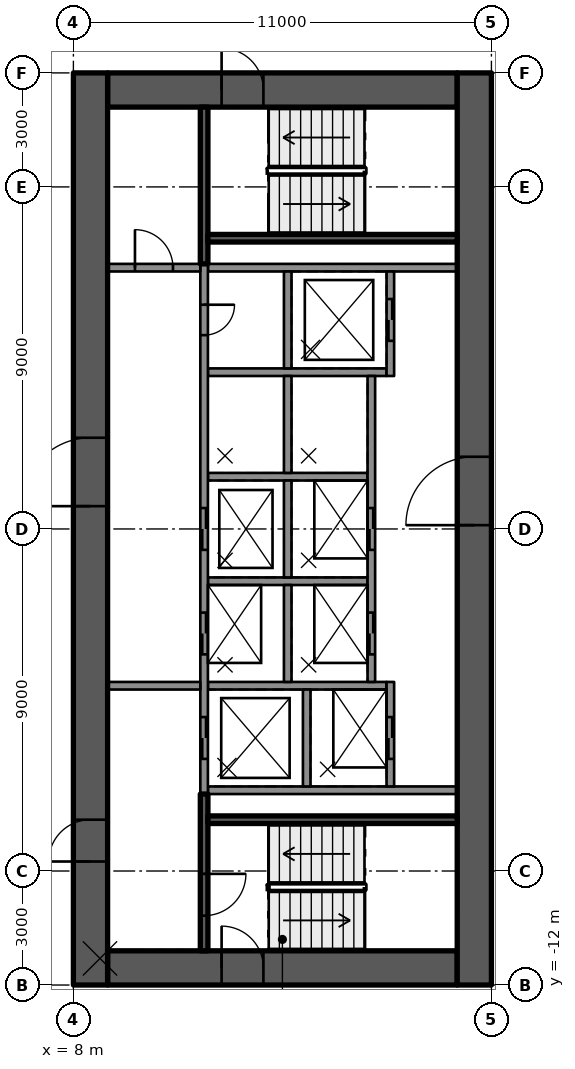
"""IFC4 building model, lengths in metres.
Left out: names, types, materials, properties, quantities, classifications, styles, units other than length and angle.
Written with IfcOpenShell. Run it as: python <this file> out.ifc"""

import sys

from ifc_helpers import new_model, si_unit, direction, frame, frame_2d, origin, place, context, subcontext, project, spatial, rectangle, extrude, element, fill, save


model = new_model("IFC4")
c1 = context("Model", 3, precision=1e-05, world=origin(), true_north=direction((0.0, 1.0)))
c2 = subcontext(c1, "Body", "Model", "MODEL_VIEW")
j1 = project(units=[si_unit("LENGTHUNIT", "METRE"), si_unit("PLANEANGLEUNIT", "RADIAN")], contexts=[c1])
p1 = place(None, origin())
s1 = spatial("IfcSite", under=j1, at=p1, CompositionType="ELEMENT")
p2 = place(p1, origin())
s2 = spatial("IfcBuilding", under=s1, at=p2, CompositionType="ELEMENT")
p3 = place(p2, frame((0.0, 0.0, 37.3)))
s3 = spatial("IfcBuildingStorey", under=s2, at=p3, CompositionType="ELEMENT", Elevation=37.3)
p4 = place(p3, frame((8.9, 11.55, 0.0), z_axis=(0.0, 0.0, 1.0), x_axis=(1.0, 0.0, 0.0)))
e1 = element("IfcWall", 1, at=p4, inside=s3, PredefinedType="SHEAR", context=c2, shape_type="SweptSolid", body=[
    extrude(rectangle(XDim=9.2, YDim=0.9, at=frame_2d((4.6, 0.0))), origin(), (0.0, 0.0, 1.0), 3.5),
])
p5 = place(p4, frame((3.0, 0.0, 0.0)))
e2 = element("IfcOpeningElement", 2, at=p5, cuts=e1, PredefinedType="OPENING", context=c2, shape_type="SweptSolid", body=[
    extrude(rectangle(XDim=1.1, YDim=2.1, at=frame_2d((0.55, 1.05))), frame((0.0, 0.46, 0.0), z_axis=(0.0, -1.0, 0.0), x_axis=(1.0, 0.0, 0.0)), (0.0, 0.0, 1.0), 0.92),
])
p6 = place(p3, frame((8.9, -11.55, 0.0), z_axis=(0.0, 0.0, 1.0), x_axis=(1.0, 0.0, 0.0)))
e3 = element("IfcWall", 3, at=p6, inside=s3, PredefinedType="SHEAR", context=c2, shape_type="SweptSolid", body=[
    extrude(rectangle(XDim=9.2, YDim=0.9, at=frame_2d((4.6, 0.0))), origin(), (0.0, 0.0, 1.0), 3.5),
])
p7 = place(p6, frame((3.0, 0.0, 0.0)))
e4 = element("IfcOpeningElement", 4, at=p7, cuts=e3, PredefinedType="OPENING", context=c2, shape_type="SweptSolid", body=[
    extrude(rectangle(XDim=1.1, YDim=2.1, at=frame_2d((0.55, 1.05))), frame((0.0, 0.46, 0.0), z_axis=(0.0, -1.0, 0.0), x_axis=(1.0, 0.0, 0.0)), (0.0, 0.0, 1.0), 0.92),
])
p8 = place(p3, frame((8.45, -12.0, 0.0), z_axis=(0.0, 0.0, 1.0), x_axis=(0.0, 1.0, 0.0)))
e5 = element("IfcWall", 5, at=p8, inside=s3, PredefinedType="SHEAR", context=c2, shape_type="SweptSolid", body=[
    extrude(rectangle(XDim=24.0, YDim=0.9, at=frame_2d((12.0, 0.0))), origin(), (0.0, 0.0, 1.0), 3.5),
])
p9 = place(p8, frame((12.6, 0.0, 0.0)))
e6 = element("IfcOpeningElement", 6, at=p9, cuts=e5, PredefinedType="OPENING", context=c2, shape_type="SweptSolid", body=[
    extrude(rectangle(XDim=1.8, YDim=2.1, at=frame_2d((0.9, 1.05))), frame((0.0, 0.46, 0.0), z_axis=(0.0, -1.0, 0.0), x_axis=(1.0, 0.0, 0.0)), (0.0, 0.0, 1.0), 0.92),
])
p10 = place(p8, frame((3.25, 0.0, 0.0)))
e7 = element("IfcOpeningElement", 7, at=p10, cuts=e5, PredefinedType="OPENING", context=c2, shape_type="SweptSolid", body=[
    extrude(rectangle(XDim=1.1, YDim=2.1, at=frame_2d((0.55, 1.05))), frame((0.0, 0.46, 0.0), z_axis=(0.0, -1.0, 0.0), x_axis=(1.0, 0.0, 0.0)), (0.0, 0.0, 1.0), 0.92),
])
p11 = place(p3, frame((18.55, -12.0, 0.0), z_axis=(0.0, 0.0, 1.0), x_axis=(0.0, 1.0, 0.0)))
e8 = element("IfcWall", 8, at=p11, inside=s3, PredefinedType="SHEAR", context=c2, shape_type="SweptSolid", body=[
    extrude(rectangle(XDim=24.0, YDim=0.9, at=frame_2d((12.0, 0.0))), origin(), (0.0, 0.0, 1.0), 3.5),
])
p12 = place(p11, frame((12.1, 0.0, 0.0)))
e9 = element("IfcOpeningElement", 9, at=p12, cuts=e8, PredefinedType="OPENING", context=c2, shape_type="SweptSolid", body=[
    extrude(rectangle(XDim=1.8, YDim=2.1, at=frame_2d((0.9, 1.05))), frame((0.0, 0.46, 0.0), z_axis=(0.0, -1.0, 0.0), x_axis=(1.0, 0.0, 0.0)), (0.0, 0.0, 1.0), 0.92),
])
for number, where, z_axis, x_axis in (
    (10, (11.54, -6.875, 0.0), (0.0, 0.0, 1.0), (1.0, 0.0, 0.0)),
    (11, (11.54, 6.875, 0.0), (0.0, 0.0, 1.0), (1.0, 0.0, 0.0)),
):
    element("IfcWall", number, at=place(p3, frame(where, z_axis=z_axis, x_axis=x_axis)), inside=s3, PredefinedType="SOLIDWALL", context=c2, shape_type="SweptSolid", body=[
        extrude(rectangle(XDim=6.56, YDim=0.2, at=frame_2d((3.28, 0.0))), origin(), (0.0, 0.0, 1.0), 3.08),
    ])
p13 = place(p3, frame((11.54, 4.125, 0.0), z_axis=(0.0, 0.0, 1.0), x_axis=(1.0, 0.0, 0.0)))
e12 = element("IfcWall", 12, at=p13, inside=s3, PredefinedType="SOLIDWALL", context=c2, shape_type="SweptSolid", body=[
    extrude(rectangle(XDim=4.7, YDim=0.2, at=frame_2d((2.35, 0.0))), origin(), (0.0, 0.0, 1.0), 3.08),
])
for number, where, z_axis, x_axis in (
    (13, (11.54, 1.375, 0.0), (0.0, 0.0, 1.0), (1.0, 0.0, 0.0)),
    (14, (11.54, -1.375, 0.0), (0.0, 0.0, 1.0), (1.0, 0.0, 0.0)),
):
    element("IfcWall", number, at=place(p3, frame(where, z_axis=z_axis, x_axis=x_axis)), inside=s3, PredefinedType="SOLIDWALL", context=c2, shape_type="SweptSolid", body=[
        extrude(rectangle(XDim=4.2, YDim=0.2, at=frame_2d((2.1, 0.0))), origin(), (0.0, 0.0, 1.0), 3.08),
    ])
p14 = place(p3, frame((11.54, -4.125, 0.0), z_axis=(0.0, 0.0, 1.0), x_axis=(1.0, 0.0, 0.0)))
e15 = element("IfcWall", 15, at=p14, inside=s3, PredefinedType="SOLIDWALL", context=c2, shape_type="SweptSolid", body=[
    extrude(rectangle(XDim=4.7, YDim=0.2, at=frame_2d((2.35, 0.0))), origin(), (0.0, 0.0, 1.0), 3.08),
])
p15 = place(p3, frame((11.44, 6.975, 0.0), z_axis=(0.0, 0.0, 1.0), x_axis=(0.0, -1.0, 0.0)))
e16 = element("IfcWall", 16, at=p15, inside=s3, PredefinedType="SOLIDWALL", context=c2, shape_type="SweptSolid", body=[
    extrude(rectangle(XDim=13.95, YDim=0.2, at=frame_2d((6.975, 0.0))), origin(), (0.0, 0.0, 1.0), 3.08),
])
p16 = place(p15, frame((6.425, 0.0, 0.0)))
e17 = element("IfcOpeningElement", 17, at=p16, cuts=e16, PredefinedType="OPENING", context=c2, shape_type="SweptSolid", body=[
    extrude(rectangle(XDim=1.1, YDim=2.1, at=frame_2d((0.55, 1.05))), frame((0.0, 0.11, 0.0), z_axis=(0.0, -1.0, 0.0), x_axis=(1.0, 0.0, 0.0)), (0.0, 0.0, 1.0), 0.22),
])
p17 = place(p15, frame((9.175, 0.0, 0.0)))
e18 = element("IfcOpeningElement", 18, at=p17, cuts=e16, PredefinedType="OPENING", context=c2, shape_type="SweptSolid", body=[
    extrude(rectangle(XDim=1.1, YDim=2.1, at=frame_2d((0.55, 1.05))), frame((0.0, 0.11, 0.0), z_axis=(0.0, -1.0, 0.0), x_axis=(1.0, 0.0, 0.0)), (0.0, 0.0, 1.0), 0.22),
])
p18 = place(p15, frame((11.925, 0.0, 0.0)))
e19 = element("IfcOpeningElement", 19, at=p18, cuts=e16, PredefinedType="OPENING", context=c2, shape_type="SweptSolid", body=[
    extrude(rectangle(XDim=1.1, YDim=2.1, at=frame_2d((0.55, 1.05))), frame((0.0, 0.11, 0.0), z_axis=(0.0, -1.0, 0.0), x_axis=(1.0, 0.0, 0.0)), (0.0, 0.0, 1.0), 0.22),
])
p19 = place(p15, frame((1.075, 0.0, 0.0)))
e20 = element("IfcOpeningElement", 20, at=p19, cuts=e16, PredefinedType="OPENING", context=c2, shape_type="SweptSolid", body=[
    extrude(rectangle(XDim=0.8, YDim=2.1, at=frame_2d((0.4, 1.05))), frame((0.0, 0.11, 0.0), z_axis=(0.0, -1.0, 0.0), x_axis=(1.0, 0.0, 0.0)), (0.0, 0.0, 1.0), 0.22),
])
for number, where, z_axis, x_axis in (
    (21, (13.64, 6.775, 0.0), (0.0, 0.0, 1.0), (0.0, -1.0, 0.0)),
    (22, (13.64, 4.025, 0.0), (0.0, 0.0, 1.0), (0.0, -1.0, 0.0)),
    (23, (13.64, 1.275, 0.0), (0.0, 0.0, 1.0), (0.0, -1.0, 0.0)),
    (24, (13.64, -1.475, 0.0), (0.0, 0.0, 1.0), (0.0, -1.0, 0.0)),
    (25, (14.14, -4.225, 0.0), (0.0, 0.0, 1.0), (0.0, -1.0, 0.0)),
):
    element("IfcWall", number, at=place(p3, frame(where, z_axis=z_axis, x_axis=x_axis)), inside=s3, PredefinedType="SOLIDWALL", context=c2, shape_type="SweptSolid", body=[
        extrude(rectangle(XDim=2.55, YDim=0.2, at=frame_2d((1.275, 0.0))), origin(), (0.0, 0.0, 1.0), 3.08),
    ])
p20 = place(p3, frame((16.34, 6.775, 0.0), z_axis=(0.0, 0.0, 1.0), x_axis=(0.0, -1.0, 0.0)))
e26 = element("IfcWall", 26, at=p20, inside=s3, PredefinedType="SOLIDWALL", context=c2, shape_type="SweptSolid", body=[
    extrude(rectangle(XDim=2.75, YDim=0.2, at=frame_2d((1.375, 0.0))), origin(), (0.0, 0.0, 1.0), 3.08),
])
p21 = place(p20, frame((0.725, 0.0, 0.0)))
e27 = element("IfcOpeningElement", 27, at=p21, cuts=e26, PredefinedType="OPENING", context=c2, shape_type="SweptSolid", body=[
    extrude(rectangle(XDim=1.1, YDim=2.1, at=frame_2d((0.55, 1.05))), frame((0.0, 0.11, 0.0), z_axis=(0.0, -1.0, 0.0), x_axis=(1.0, 0.0, 0.0)), (0.0, 0.0, 1.0), 0.22),
])
p22 = place(p3, frame((15.84, 4.025, 0.0), z_axis=(0.0, 0.0, 1.0), x_axis=(0.0, -1.0, 0.0)))
e28 = element("IfcWall", 28, at=p22, inside=s3, PredefinedType="SOLIDWALL", context=c2, shape_type="SweptSolid", body=[
    extrude(rectangle(XDim=8.05, YDim=0.2, at=frame_2d((4.025, 0.0))), origin(), (0.0, 0.0, 1.0), 3.08),
])
p23 = place(p22, frame((3.475, 0.0, 0.0)))
e29 = element("IfcOpeningElement", 29, at=p23, cuts=e28, PredefinedType="OPENING", context=c2, shape_type="SweptSolid", body=[
    extrude(rectangle(XDim=1.1, YDim=2.1, at=frame_2d((0.55, 1.05))), frame((0.0, 0.11, 0.0), z_axis=(0.0, -1.0, 0.0), x_axis=(1.0, 0.0, 0.0)), (0.0, 0.0, 1.0), 0.22),
])
p24 = place(p22, frame((6.225, 0.0, 0.0)))
e30 = element("IfcOpeningElement", 30, at=p24, cuts=e28, PredefinedType="OPENING", context=c2, shape_type="SweptSolid", body=[
    extrude(rectangle(XDim=1.1, YDim=2.1, at=frame_2d((0.55, 1.05))), frame((0.0, 0.11, 0.0), z_axis=(0.0, -1.0, 0.0), x_axis=(1.0, 0.0, 0.0)), (0.0, 0.0, 1.0), 0.22),
])
p25 = place(p3, frame((16.34, -4.025, 0.0), z_axis=(0.0, 0.0, 1.0), x_axis=(0.0, -1.0, 0.0)))
e31 = element("IfcWall", 31, at=p25, inside=s3, PredefinedType="SOLIDWALL", context=c2, shape_type="SweptSolid", body=[
    extrude(rectangle(XDim=2.75, YDim=0.2, at=frame_2d((1.375, 0.0))), origin(), (0.0, 0.0, 1.0), 3.08),
])
p26 = place(p25, frame((0.925, 0.0, 0.0)))
e32 = element("IfcOpeningElement", 32, at=p26, cuts=e31, PredefinedType="OPENING", context=c2, shape_type="SweptSolid", body=[
    extrude(rectangle(XDim=1.1, YDim=2.1, at=frame_2d((0.55, 1.05))), frame((0.0, 0.11, 0.0), z_axis=(0.0, -1.0, 0.0), x_axis=(1.0, 0.0, 0.0)), (0.0, 0.0, 1.0), 0.22),
])
p27 = place(p3, frame((11.44, -6.975, 0.0), z_axis=(0.0, 0.0, 1.0), x_axis=(0.0, -1.0, 0.0)))
e33 = element("IfcWall", 33, at=p27, inside=s3, PredefinedType="SOLIDWALL", context=c2, shape_type="SweptSolid", body=[
    extrude(rectangle(XDim=4.125, YDim=0.2, at=frame_2d((2.062, 0.0))), origin(), (0.0, 0.0, 1.0), 3.08),
])
p28 = place(p27, frame((2.1, 0.0, 0.0)))
e34 = element("IfcOpeningElement", 34, at=p28, cuts=e33, PredefinedType="OPENING", context=c2, shape_type="SweptSolid", body=[
    extrude(rectangle(XDim=1.1, YDim=2.1, at=frame_2d((0.55, 1.05))), frame((0.0, 0.11, 0.0), z_axis=(0.0, -1.0, 0.0), x_axis=(1.0, 0.0, 0.0)), (0.0, 0.0, 1.0), 0.22),
])
p29 = place(p3, frame((11.54, -7.65, 0.0), z_axis=(0.0, 0.0, 1.0), x_axis=(1.0, 0.0, 0.0)))
e35 = element("IfcWall", 35, at=p29, inside=s3, PredefinedType="SOLIDWALL", context=c2, shape_type="SweptSolid", body=[
    extrude(rectangle(XDim=6.56, YDim=0.2, at=frame_2d((3.28, 0.0))), origin(), (0.0, 0.0, 1.0), 3.08),
])
p30 = place(p3, frame((11.44, 11.1, 0.0), z_axis=(0.0, 0.0, 1.0), x_axis=(0.0, -1.0, 0.0)))
e36 = element("IfcWall", 36, at=p30, inside=s3, PredefinedType="SOLIDWALL", context=c2, shape_type="SweptSolid", body=[
    extrude(rectangle(XDim=4.125, YDim=0.2, at=frame_2d((2.062, 0.0))), origin(), (0.0, 0.0, 1.0), 3.08),
])
p31 = place(p3, frame((11.54, 7.65, 0.0), z_axis=(0.0, 0.0, 1.0), x_axis=(1.0, 0.0, 0.0)))
e37 = element("IfcWall", 37, at=p31, inside=s3, PredefinedType="SOLIDWALL", context=c2, shape_type="SweptSolid", body=[
    extrude(rectangle(XDim=6.56, YDim=0.2, at=frame_2d((3.28, 0.0))), origin(), (0.0, 0.0, 1.0), 3.08),
])
p32 = place(p3, frame((8.9, -4.125, 0.0), z_axis=(0.0, 0.0, 1.0), x_axis=(1.0, 0.0, 0.0)))
e38 = element("IfcWall", 38, at=p32, inside=s3, PredefinedType="PARTITIONING", context=c2, shape_type="SweptSolid", body=[
    extrude(rectangle(XDim=2.44, YDim=0.2, at=frame_2d((1.22, 0.0))), origin(), (0.0, 0.0, 1.0), 3.08),
])
p33 = place(p3, frame((8.9, 6.875, 0.0), z_axis=(0.0, 0.0, 1.0), x_axis=(1.0, 0.0, 0.0)))
e39 = element("IfcWall", 39, at=p33, inside=s3, PredefinedType="PARTITIONING", context=c2, shape_type="SweptSolid", body=[
    extrude(rectangle(XDim=2.44, YDim=0.2, at=frame_2d((1.22, 0.0))), origin(), (0.0, 0.0, 1.0), 3.08),
])
p34 = place(p33, frame((0.72, 0.0, 0.0)))
e40 = element("IfcOpeningElement", 40, at=p34, cuts=e39, PredefinedType="OPENING", context=c2, shape_type="SweptSolid", body=[
    extrude(rectangle(XDim=1.0, YDim=2.1, at=frame_2d((0.5, 1.05))), frame((0.0, 0.11, 0.0), z_axis=(0.0, -1.0, 0.0), x_axis=(1.0, 0.0, 0.0)), (0.0, 0.0, 1.0), 0.22),
])
p35 = place(p21, origin())
e41 = element("IfcDoor", 41, at=p35, inside=s3, OperationType="DOUBLE_DOOR_SLIDING", PredefinedType="DOOR", context=c2, shape_type="SweptSolid", body=[
    extrude(rectangle(XDim=1.1, YDim=2.1, at=frame_2d((0.55, 1.05))), frame((0.0, 0.025, 0.0), z_axis=(0.0, -1.0, 0.0), x_axis=(1.0, 0.0, 0.0)), (0.0, 0.0, 1.0), 0.05),
])
fill(e27, e41)
p36 = place(p16, origin())
e42 = element("IfcDoor", 42, at=p36, inside=s3, OperationType="DOUBLE_DOOR_SLIDING", PredefinedType="DOOR", context=c2, shape_type="SweptSolid", body=[
    extrude(rectangle(XDim=1.1, YDim=2.1, at=frame_2d((0.55, 1.05))), frame((0.0, 0.025, 0.0), z_axis=(0.0, -1.0, 0.0), x_axis=(1.0, 0.0, 0.0)), (0.0, 0.0, 1.0), 0.05),
])
fill(e17, e42)
p37 = place(p23, origin())
e43 = element("IfcDoor", 43, at=p37, inside=s3, OperationType="DOUBLE_DOOR_SLIDING", PredefinedType="DOOR", context=c2, shape_type="SweptSolid", body=[
    extrude(rectangle(XDim=1.1, YDim=2.1, at=frame_2d((0.55, 1.05))), frame((0.0, 0.025, 0.0), z_axis=(0.0, -1.0, 0.0), x_axis=(1.0, 0.0, 0.0)), (0.0, 0.0, 1.0), 0.05),
])
fill(e29, e43)
p38 = place(p17, origin())
e44 = element("IfcDoor", 44, at=p38, inside=s3, OperationType="DOUBLE_DOOR_SLIDING", PredefinedType="DOOR", context=c2, shape_type="SweptSolid", body=[
    extrude(rectangle(XDim=1.1, YDim=2.1, at=frame_2d((0.55, 1.05))), frame((0.0, 0.025, 0.0), z_axis=(0.0, -1.0, 0.0), x_axis=(1.0, 0.0, 0.0)), (0.0, 0.0, 1.0), 0.05),
])
fill(e18, e44)
p39 = place(p24, origin())
e45 = element("IfcDoor", 45, at=p39, inside=s3, OperationType="DOUBLE_DOOR_SLIDING", PredefinedType="DOOR", context=c2, shape_type="SweptSolid", body=[
    extrude(rectangle(XDim=1.1, YDim=2.1, at=frame_2d((0.55, 1.05))), frame((0.0, 0.025, 0.0), z_axis=(0.0, -1.0, 0.0), x_axis=(1.0, 0.0, 0.0)), (0.0, 0.0, 1.0), 0.05),
])
fill(e30, e45)
p40 = place(p18, origin())
e46 = element("IfcDoor", 46, at=p40, inside=s3, OperationType="DOUBLE_DOOR_SLIDING", PredefinedType="DOOR", context=c2, shape_type="SweptSolid", body=[
    extrude(rectangle(XDim=1.1, YDim=2.1, at=frame_2d((0.55, 1.05))), frame((0.0, 0.025, 0.0), z_axis=(0.0, -1.0, 0.0), x_axis=(1.0, 0.0, 0.0)), (0.0, 0.0, 1.0), 0.05),
])
fill(e19, e46)
p41 = place(p26, origin())
e47 = element("IfcDoor", 47, at=p41, inside=s3, OperationType="DOUBLE_DOOR_SLIDING", PredefinedType="DOOR", context=c2, shape_type="SweptSolid", body=[
    extrude(rectangle(XDim=1.1, YDim=2.1, at=frame_2d((0.55, 1.05))), frame((0.0, 0.025, 0.0), z_axis=(0.0, -1.0, 0.0), x_axis=(1.0, 0.0, 0.0)), (0.0, 0.0, 1.0), 0.05),
])
fill(e32, e47)
p42 = place(p19, origin())
e48 = element("IfcDoor", 48, at=p42, inside=s3, OperationType="SINGLE_SWING_LEFT", PredefinedType="DOOR", context=c2, shape_type="SweptSolid", body=[
    extrude(rectangle(XDim=0.8, YDim=2.1, at=frame_2d((0.4, 1.05))), frame((0.0, 0.025, 0.0), z_axis=(0.0, -1.0, 0.0), x_axis=(1.0, 0.0, 0.0)), (0.0, 0.0, 1.0), 0.05),
])
fill(e20, e48)
p43 = place(p9, origin())
e49 = element("IfcDoor", 49, at=p43, inside=s3, OperationType="SINGLE_SWING_RIGHT", PredefinedType="DOOR", context=c2, shape_type="SweptSolid", body=[
    extrude(rectangle(XDim=1.8, YDim=2.1, at=frame_2d((0.9, 1.05))), frame((0.0, 0.025, 0.0), z_axis=(0.0, -1.0, 0.0), x_axis=(1.0, 0.0, 0.0)), (0.0, 0.0, 1.0), 0.05),
])
fill(e6, e49)
p44 = place(p12, origin())
e50 = element("IfcDoor", 50, at=p44, inside=s3, OperationType="SINGLE_SWING_RIGHT", PredefinedType="DOOR", context=c2, shape_type="SweptSolid", body=[
    extrude(rectangle(XDim=1.8, YDim=2.1, at=frame_2d((0.9, 1.05))), frame((0.0, 0.025, 0.0), z_axis=(0.0, -1.0, 0.0), x_axis=(1.0, 0.0, 0.0)), (0.0, 0.0, 1.0), 0.05),
])
fill(e9, e50)
p45 = place(p10, origin())
e51 = element("IfcDoor", 51, at=p45, inside=s3, OperationType="SINGLE_SWING_LEFT", PredefinedType="DOOR", context=c2, shape_type="SweptSolid", body=[
    extrude(rectangle(XDim=1.1, YDim=2.1, at=frame_2d((0.55, 1.05))), frame((0.0, 0.025, 0.0), z_axis=(0.0, -1.0, 0.0), x_axis=(1.0, 0.0, 0.0)), (0.0, 0.0, 1.0), 0.05),
])
fill(e7, e51)
p46 = place(p7, origin())
e52 = element("IfcDoor", 52, at=p46, inside=s3, OperationType="SINGLE_SWING_LEFT", PredefinedType="DOOR", context=c2, shape_type="SweptSolid", body=[
    extrude(rectangle(XDim=1.1, YDim=2.1, at=frame_2d((0.55, 1.05))), frame((0.0, 0.025, 0.0), z_axis=(0.0, -1.0, 0.0), x_axis=(1.0, 0.0, 0.0)), (0.0, 0.0, 1.0), 0.05),
])
fill(e4, e52)
p47 = place(p5, origin())
e53 = element("IfcDoor", 53, at=p47, inside=s3, OperationType="SINGLE_SWING_LEFT", PredefinedType="DOOR", context=c2, shape_type="SweptSolid", body=[
    extrude(rectangle(XDim=1.1, YDim=2.1, at=frame_2d((0.55, 1.05))), frame((0.0, 0.025, 0.0), z_axis=(0.0, -1.0, 0.0), x_axis=(1.0, 0.0, 0.0)), (0.0, 0.0, 1.0), 0.05),
])
fill(e2, e53)
p48 = place(p28, origin())
e54 = element("IfcDoor", 54, at=p48, inside=s3, OperationType="SINGLE_SWING_RIGHT", PredefinedType="DOOR", context=c2, shape_type="SweptSolid", body=[
    extrude(rectangle(XDim=1.1, YDim=2.1, at=frame_2d((0.55, 1.05))), frame((0.0, 0.025, 0.0), z_axis=(0.0, -1.0, 0.0), x_axis=(1.0, 0.0, 0.0)), (0.0, 0.0, 1.0), 0.05),
])
fill(e34, e54)
p49 = place(p34, origin())
e55 = element("IfcDoor", 55, at=p49, inside=s3, OperationType="SINGLE_SWING_RIGHT", PredefinedType="DOOR", context=c2, shape_type="SweptSolid", body=[
    extrude(rectangle(XDim=1.0, YDim=2.1, at=frame_2d((0.5, 1.05))), frame((0.0, 0.025, 0.0), z_axis=(0.0, -1.0, 0.0), x_axis=(1.0, 0.0, 0.0)), (0.0, 0.0, 1.0), 0.05),
])
fill(e40, e55)
save(model, sys.argv[1])
